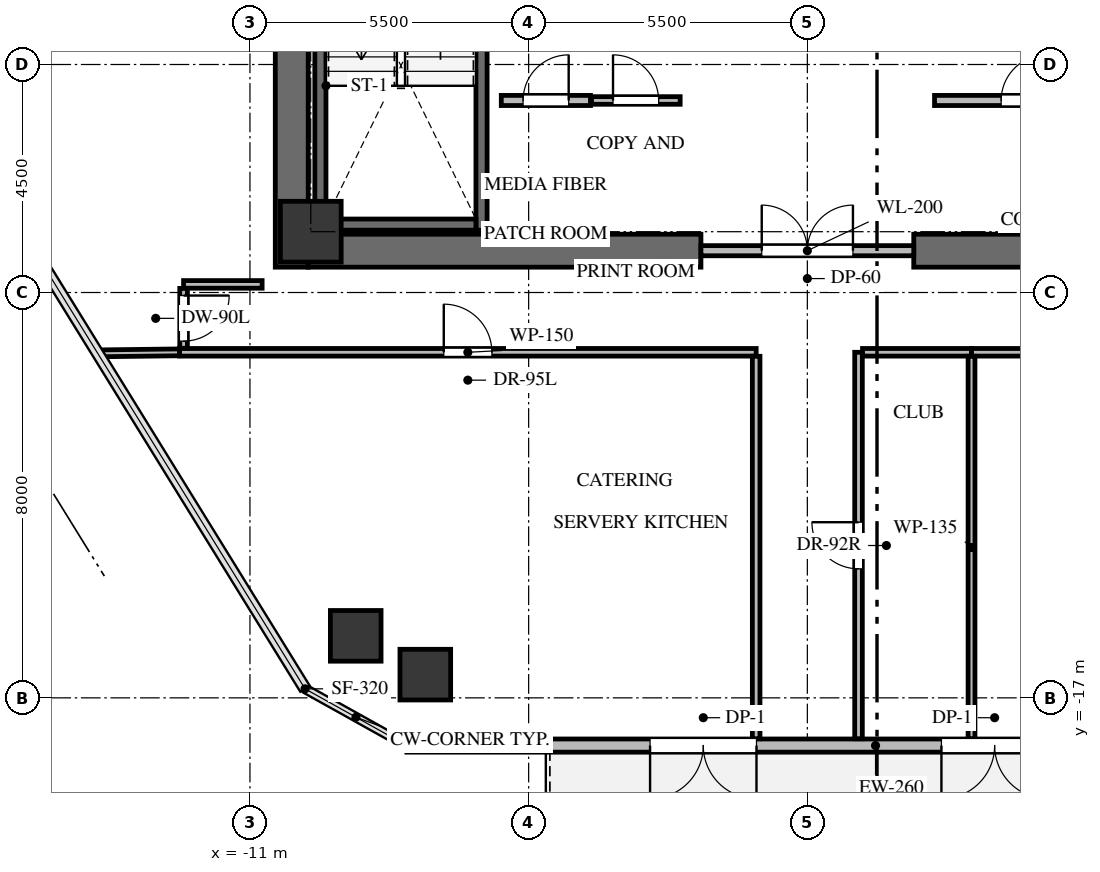
"""IFC4 building model, lengths in metres.
Left out: names, types, materials, properties, quantities, classifications, styles, units other than length and angle.
Written with IfcOpenShell. Run it as: python <this file> out.ifc"""

import sys

from ifc_helpers import new_model, si_unit, direction, frame, frame_2d, origin, origin_2d, place, context, subcontext, project, spatial, rectangle, extrude, source, transform, mapped, element, fill, save


model = new_model("IFC4")
c1 = context("Model", 3, precision=1e-05, world=origin(), true_north=direction((0.0, 1.0)))
c2 = subcontext(c1, "Body", "Model", "MODEL_VIEW")
j1 = project(units=[si_unit("LENGTHUNIT", "METRE"), si_unit("PLANEANGLEUNIT", "RADIAN")], contexts=[c1])
p1 = place(None, origin())
s1 = spatial("IfcSite", under=j1, at=p1, CompositionType="ELEMENT")
p2 = place(p1, origin())
s2 = spatial("IfcBuilding", under=s1, at=p2, CompositionType="ELEMENT")
p3 = place(p2, frame((0.0, 0.0, 162.6)))
s3 = spatial("IfcBuildingStorey", under=s2, at=p3, CompositionType="ELEMENT", Elevation=162.6)
p4 = place(p3, frame((-10.175, -8.5, 0.0), z_axis=(0.0, 0.0, 1.0), x_axis=(0.0, 1.0, 0.0)))
e1 = element("IfcWall", 1, at=p4, inside=s3, PredefinedType="SHEAR", context=c2, shape_type="SweptSolid", body=[
    extrude(rectangle(XDim=17.0, YDim=0.65, at=frame_2d((8.5, 0.0))), origin(), (0.0, 0.0, 1.0), 4.6),
])
for number, where, z_axis, x_axis in (
    (2, (-9.85, -8.175, 0.0), (0.0, 0.0, 1.0), (1.0, 0.0, 0.0)),
    (3, (2.1, -8.175, 0.0), (0.0, 0.0, 1.0), (1.0, 0.0, 0.0)),
):
    element("IfcWall", number, at=place(p3, frame(where, z_axis=z_axis, x_axis=x_axis)), inside=s3, PredefinedType="SHEAR", context=c2, shape_type="SweptSolid", body=[
        extrude(rectangle(XDim=7.75, YDim=0.65, at=frame_2d((3.875, 0.0))), origin(), (0.0, 0.0, 1.0), 4.6),
    ])
p5 = place(p3, frame((-6.43, -7.77, -0.32), z_axis=(0.0, 0.0, 1.0), x_axis=(0.0, 1.0, 0.0)))
e4 = element("IfcWall", 4, at=p5, inside=s3, PredefinedType="SHEAR", context=c2, shape_type="SweptSolid", body=[
    extrude(rectangle(XDim=7.89, YDim=0.22, at=frame_2d((3.945, 0.0))), origin(), (0.0, 0.0, 1.0), 4.68),
])
p6 = place(p5, frame((6.32, 0.0, 0.0)))
e5 = element("IfcOpeningElement", 5, at=p6, cuts=e4, PredefinedType="OPENING", context=c2, shape_type="SweptSolid", body=[
    extrude(rectangle(XDim=1.05, YDim=2.15, at=frame_2d((0.525, 1.075))), frame((0.0, 0.12, 0.0), z_axis=(0.0, -1.0, 0.0), x_axis=(1.0, 0.0, 0.0)), (0.0, 0.0, 1.0), 0.24),
])
p7 = place(p3, frame((-9.61, 0.12, -0.32), z_axis=(0.0, 0.0, 1.0), x_axis=(0.0, -1.0, 0.0)))
e6 = element("IfcWall", 6, at=p7, inside=s3, PredefinedType="SHEAR", context=c2, shape_type="SweptSolid", body=[
    extrude(rectangle(XDim=7.89, YDim=0.22, at=frame_2d((3.945, 0.0))), origin(), (0.0, 0.0, 1.0), 4.68),
])
p8 = place(p3, frame((-9.5, -7.66, -0.32), z_axis=(0.0, 0.0, 1.0), x_axis=(1.0, 0.0, 0.0)))
e7 = element("IfcWall", 7, at=p8, inside=s3, PredefinedType="SHEAR", context=c2, shape_type="SweptSolid", body=[
    extrude(rectangle(XDim=2.96, YDim=0.22, at=frame_2d((1.48, 0.0))), origin(), (0.0, 0.0, 1.0), 4.68),
])
m1 = source(origin(), c2, "Body", "SweptSolid", [
    extrude(rectangle(XDim=1.2, YDim=1.2, at=origin_2d()), origin(), (0.0, 0.0, 1.0), 4.68),
])
p9 = place(p3, frame((-9.8, -7.8, -0.32), z_axis=(0.0, 0.0, 1.0), x_axis=(1.0, 0.0, 0.0)))
e8 = element("IfcColumn", 8, at=p9, inside=s3, PredefinedType="COLUMN", context=c2, shape_type="MappedRepresentation", body=[
    mapped(m1, transform((0.0, 0.0, 0.0), x_axis=(1.0, 0.0, 0.0), y_axis=(0.0, 1.0, 0.0), z_axis=(0.0, 0.0, 1.0), scale=1.0)),
])
m2 = source(origin(), c2, "Body", "SweptSolid", [
    extrude(rectangle(XDim=1.0, YDim=1.0, at=origin_2d()), origin(), (0.0, 0.0, 1.0), 4.68),
])
for number, where, z_axis, x_axis in (
    (9, (-8.913, -15.776, -0.32), (0.0, 0.0, 1.0), (1.0, 0.0, 0.0)),
    (10, (-7.54, -16.542, -0.32), (0.0, 0.0, 1.0), (1.0, 0.0, 0.0)),
):
    element("IfcColumn", number, at=place(p3, frame(where, z_axis=z_axis, x_axis=x_axis)), inside=s3, PredefinedType="COLUMN", context=c2, shape_type="MappedRepresentation", body=[
        mapped(m2, transform((0.0, 0.0, 0.0), x_axis=(1.0, 0.0, 0.0), y_axis=(0.0, 1.0, 0.0), z_axis=(0.0, 0.0, 1.0), scale=1.0)),
    ])
p10 = place(p3, frame((10.595, -17.942, 0.0), z_axis=(0.0, 0.0, 1.0), x_axis=(-1.0, 0.0, 0.0)))
e11 = element("IfcWall", 11, at=p10, inside=s3, PredefinedType="SOLIDWALL", context=c2, shape_type="SweptSolid", body=[
    extrude(rectangle(XDim=18.499, YDim=0.26, at=frame_2d((9.249, 0.0))), origin(), (0.0, 0.0, 1.0), 4.36),
])
p11 = place(p10, frame((5.849, 0.0, 0.0)))
e12 = element("IfcOpeningElement", 12, at=p11, cuts=e11, PredefinedType="OPENING", context=c2, shape_type="SweptSolid", body=[
    extrude(rectangle(XDim=2.1, YDim=2.4, at=frame_2d((1.05, 1.2))), frame((0.0, 0.14, 0.0), z_axis=(0.0, -1.0, 0.0), x_axis=(1.0, 0.0, 0.0)), (0.0, 0.0, 1.0), 0.28),
])
p12 = place(p10, frame((11.599, 0.0, 0.0)))
e13 = element("IfcOpeningElement", 13, at=p12, cuts=e11, PredefinedType="OPENING", context=c2, shape_type="SweptSolid", body=[
    extrude(rectangle(XDim=2.1, YDim=2.4, at=frame_2d((1.05, 1.2))), frame((0.0, 0.14, 0.0), z_axis=(0.0, -1.0, 0.0), x_axis=(1.0, 0.0, 0.0)), (0.0, 0.0, 1.0), 0.28),
])
p13 = place(p3, frame((-2.1, -8.175, 0.0), z_axis=(0.0, 0.0, 1.0), x_axis=(1.0, 0.0, 0.0)))
e14 = element("IfcWall", 14, at=p13, inside=s3, PredefinedType="SOLIDWALL", context=c2, shape_type="SweptSolid", body=[
    extrude(rectangle(XDim=4.2, YDim=0.2, at=frame_2d((2.1, 0.0))), origin(), (0.0, 0.0, 1.0), 4.345),
])
p14 = place(p13, frame((1.2, 0.0, 0.0)))
e15 = element("IfcOpeningElement", 15, at=p14, cuts=e14, PredefinedType="OPENING", context=c2, shape_type="SweptSolid", body=[
    extrude(rectangle(XDim=1.8, YDim=2.15, at=frame_2d((0.9, 1.075))), frame((0.0, 0.11, 0.0), z_axis=(0.0, -1.0, 0.0), x_axis=(1.0, 0.0, 0.0)), (0.0, 0.0, 1.0), 0.22),
])
p15 = place(p3, frame((-6.04, -5.21, 0.0), z_axis=(0.0, 0.0, 1.0), x_axis=(1.0, 0.0, 0.0)))
e16 = element("IfcWall", 16, at=p15, inside=s3, PredefinedType="SOLIDWALL", context=c2, shape_type="SweptSolid", body=[
    extrude(rectangle(XDim=1.76, YDim=0.2, at=frame_2d((0.88, 0.0))), origin(), (0.0, 0.0, 1.0), 4.345),
])
p16 = place(p15, frame((0.43, 0.0, 0.0)))
e17 = element("IfcOpeningElement", 17, at=p16, cuts=e16, PredefinedType="OPENING", context=c2, shape_type="SweptSolid", body=[
    extrude(rectangle(XDim=0.9, YDim=2.05, at=frame_2d((0.45, 1.025))), frame((0.0, 0.11, 0.0), z_axis=(0.0, -1.0, 0.0), x_axis=(1.0, 0.0, 0.0)), (0.0, 0.0, 1.0), 0.22),
])
p17 = place(p3, frame((-4.26, -5.21, 0.0), z_axis=(0.0, 0.0, 1.0), x_axis=(1.0, 0.0, 0.0)))
e18 = element("IfcWall", 18, at=p17, inside=s3, PredefinedType="PARTITIONING", context=c2, shape_type="SweptSolid", body=[
    extrude(rectangle(XDim=1.75, YDim=0.15, at=frame_2d((0.875, 0.0))), origin(), (0.0, 0.0, 1.0), 4.345),
])
p18 = place(p17, frame((0.425, 0.0, 0.0)))
e19 = element("IfcOpeningElement", 19, at=p18, cuts=e18, PredefinedType="OPENING", context=c2, shape_type="SweptSolid", body=[
    extrude(rectangle(XDim=0.9, YDim=2.05, at=frame_2d((0.45, 1.025))), frame((0.0, 0.085, 0.0), z_axis=(0.0, -1.0, 0.0), x_axis=(1.0, 0.0, 0.0)), (0.0, 0.0, 1.0), 0.17),
])
p19 = place(p3, frame((2.51, -5.21, 0.0), z_axis=(0.0, 0.0, 1.0), x_axis=(1.0, 0.0, 0.0)))
e20 = element("IfcWall", 20, at=p19, inside=s3, PredefinedType="SOLIDWALL", context=c2, shape_type="SweptSolid", body=[
    extrude(rectangle(XDim=3.53, YDim=0.2, at=frame_2d((1.765, 0.0))), origin(), (0.0, 0.0, 1.0), 4.345),
])
p20 = place(p19, frame((1.315, 0.0, 0.0)))
e21 = element("IfcOpeningElement", 21, at=p20, cuts=e20, PredefinedType="OPENING", context=c2, shape_type="SweptSolid", body=[
    extrude(rectangle(XDim=0.9, YDim=2.05, at=frame_2d((0.45, 1.025))), frame((0.0, 0.11, 0.0), z_axis=(0.0, -1.0, 0.0), x_axis=(1.0, 0.0, 0.0)), (0.0, 0.0, 1.0), 0.22),
])
p21 = place(p3, frame((-12.39, -10.18, 0.0), z_axis=(0.0, 0.0, 1.0), x_axis=(1.0, 0.0, 0.0)))
e22 = element("IfcWall", 22, at=p21, inside=s3, PredefinedType="PARTITIONING", context=c2, shape_type="SweptSolid", body=[
    extrude(rectangle(XDim=11.38, YDim=0.15, at=frame_2d((5.69, 0.0))), origin(), (0.0, 0.0, 1.0), 3.542),
])
p22 = place(p21, frame((5.215, 0.0, 0.0)))
e23 = element("IfcOpeningElement", 23, at=p22, cuts=e22, PredefinedType="OPENING", context=c2, shape_type="SweptSolid", body=[
    extrude(rectangle(XDim=0.95, YDim=2.1, at=frame_2d((0.475, 1.05))), frame((0.0, 0.085, 0.0), z_axis=(0.0, -1.0, 0.0), x_axis=(1.0, 0.0, 0.0)), (0.0, 0.0, 1.0), 0.17),
])
p23 = place(p3, frame((-1.01, -10.259, 0.0), z_axis=(0.0, 0.0, 1.0), x_axis=(0.0, -1.0, 0.0)))
e24 = element("IfcWall", 24, at=p23, inside=s3, PredefinedType="PARTITIONING", context=c2, shape_type="SweptSolid", body=[
    extrude(rectangle(XDim=7.548, YDim=0.15, at=frame_2d((3.774, 0.0))), origin(), (0.0, 0.0, 1.0), 3.699),
])
p24 = place(p3, frame((1.01, -17.807, 0.0), z_axis=(0.0, 0.0, 1.0), x_axis=(0.0, 1.0, 0.0)))
e25 = element("IfcWall", 25, at=p24, inside=s3, PredefinedType="PARTITIONING", context=c2, shape_type="SweptSolid", body=[
    extrude(rectangle(XDim=7.627, YDim=0.15, at=frame_2d((3.813, 0.0))), origin(), (0.0, 0.0, 1.0), 3.699),
])
p25 = place(p24, frame((3.354, 0.0, 0.0)))
e26 = element("IfcOpeningElement", 26, at=p25, cuts=e25, PredefinedType="OPENING", context=c2, shape_type="SweptSolid", body=[
    extrude(rectangle(XDim=0.92, YDim=2.1, at=frame_2d((0.46, 1.05))), frame((0.0, 0.085, 0.0), z_axis=(0.0, -1.0, 0.0), x_axis=(1.0, 0.0, 0.0)), (0.0, 0.0, 1.0), 0.17),
])
p26 = place(p3, frame((1.089, -10.18, 0.0), z_axis=(0.0, 0.0, 1.0), x_axis=(1.0, 0.0, 0.0)))
e27 = element("IfcWall", 27, at=p26, inside=s3, PredefinedType="PARTITIONING", context=c2, shape_type="SweptSolid", body=[
    extrude(rectangle(XDim=2.151, YDim=0.15, at=frame_2d((1.075, 0.0))), origin(), (0.0, 0.0, 1.0), 3.908),
])
p27 = place(p3, frame((3.24, -10.18, 0.0), z_axis=(0.0, 0.0, 1.0), x_axis=(1.0, 0.0, 0.0)))
e28 = element("IfcWall", 28, at=p27, inside=s3, PredefinedType="PARTITIONING", context=c2, shape_type="SweptSolid", body=[
    extrude(rectangle(XDim=9.02, YDim=0.15, at=frame_2d((4.51, 0.0))), origin(), (0.0, 0.0, 1.0), 3.542),
])
p28 = place(p27, frame((4.035, 0.0, 0.0)))
e29 = element("IfcOpeningElement", 29, at=p28, cuts=e28, PredefinedType="OPENING", context=c2, shape_type="SweptSolid", body=[
    extrude(rectangle(XDim=0.95, YDim=2.1, at=frame_2d((0.475, 1.05))), frame((0.0, 0.085, 0.0), z_axis=(0.0, -1.0, 0.0), x_axis=(1.0, 0.0, 0.0)), (0.0, 0.0, 1.0), 0.17),
])
p29 = place(p3, frame((-10.76, -8.84, 0.0), z_axis=(0.0, 0.0, 1.0), x_axis=(-1.0, 0.0, 0.0)))
e30 = element("IfcWall", 30, at=p29, inside=s3, PredefinedType="PARTITIONING", context=c2, shape_type="SweptSolid", body=[
    extrude(rectangle(XDim=1.55, YDim=0.15, at=frame_2d((0.775, 0.0))), origin(), (0.0, 0.0, 1.0), 4.345),
])
p30 = place(p3, frame((-12.31, -8.919, 0.0), z_axis=(0.0, 0.0, 1.0), x_axis=(0.0, -1.0, 0.0)))
e31 = element("IfcWall", 31, at=p30, inside=s3, PredefinedType="PARTITIONING", context=c2, shape_type="SweptSolid", body=[
    extrude(rectangle(XDim=1.182, YDim=0.15, at=frame_2d((0.591, 0.0))), origin(), (0.0, 0.0, 1.0), 3.699),
])
p31 = place(p30, frame((0.141, 0.0, 0.0)))
e32 = element("IfcOpeningElement", 32, at=p31, cuts=e31, PredefinedType="OPENING", context=c2, shape_type="SweptSolid", body=[
    extrude(rectangle(XDim=0.9, YDim=2.05, at=frame_2d((0.45, 1.025))), frame((0.0, 0.085, 0.0), z_axis=(0.0, -1.0, 0.0), x_axis=(1.0, 0.0, 0.0)), (0.0, 0.0, 1.0), 0.17),
])
p32 = place(p3, frame((-14.004, -10.201, 0.0), z_axis=(0.0, 0.0, 1.0), x_axis=(0.999923084603, 0.012402615782, 0.0)))
e33 = element("IfcWall", 33, at=p32, inside=s3, PredefinedType="PARTITIONING", context=c2, shape_type="SweptSolid", body=[
    extrude(rectangle(XDim=1.614, YDim=0.135, at=frame_2d((0.807, 0.0))), origin(), (0.0, 0.0, 1.0), 3.699),
])
p33 = place(p3, frame((3.24, -10.259, 0.0), z_axis=(0.0, 0.0, 1.0), x_axis=(0.0, -1.0, 0.0)))
e34 = element("IfcWall", 34, at=p33, inside=s3, PredefinedType="PARTITIONING", context=c2, shape_type="SweptSolid", body=[
    extrude(rectangle(XDim=7.548, YDim=0.135, at=frame_2d((3.774, 0.0))), origin(), (0.0, 0.0, 1.0), 3.699),
])
m3 = source(origin(), c2, "Body", "SweptSolid", [
    extrude(rectangle(XDim=2.1, YDim=2.4, at=frame_2d((1.05, 1.2))), frame((0.0, 0.025, 0.0), z_axis=(0.0, -1.0, 0.0), x_axis=(1.0, 0.0, 0.0)), (0.0, 0.0, 1.0), 0.05),
])
p34 = place(p11, origin())
e35 = element("IfcDoor", 35, at=p34, inside=s3, OperationType="DOUBLE_DOOR_SINGLE_SWING", PredefinedType="DOOR", context=c2, shape_type="MappedRepresentation", body=[
    mapped(m3, transform((0.0, 0.0, 0.0), x_axis=(1.0, 0.0, 0.0), y_axis=(0.0, 1.0, 0.0), z_axis=(0.0, 0.0, 1.0), scale=1.0)),
])
fill(e12, e35)
p35 = place(p12, origin())
e36 = element("IfcDoor", 36, at=p35, inside=s3, OperationType="DOUBLE_DOOR_SINGLE_SWING", PredefinedType="DOOR", context=c2, shape_type="MappedRepresentation", body=[
    mapped(m3, transform((0.0, 0.0, 0.0), x_axis=(1.0, 0.0, 0.0), y_axis=(0.0, 1.0, 0.0), z_axis=(0.0, 0.0, 1.0), scale=1.0)),
])
fill(e13, e36)
m4 = source(origin(), c2, "Body", "SweptSolid", [
    extrude(rectangle(XDim=1.8, YDim=2.15, at=frame_2d((0.9, 1.075))), frame((0.0, 0.025, 0.0), z_axis=(0.0, -1.0, 0.0), x_axis=(1.0, 0.0, 0.0)), (0.0, 0.0, 1.0), 0.05),
])
p36 = place(p14, origin())
e37 = element("IfcDoor", 37, at=p36, inside=s3, OperationType="DOUBLE_DOOR_SINGLE_SWING", PredefinedType="DOOR", context=c2, shape_type="MappedRepresentation", body=[
    mapped(m4, transform((0.0, 0.0, 0.0), x_axis=(1.0, 0.0, 0.0), y_axis=(0.0, 1.0, 0.0), z_axis=(0.0, 0.0, 1.0), scale=1.0)),
])
fill(e15, e37)
m5 = source(origin(), c2, "Body", "SweptSolid", [
    extrude(rectangle(XDim=0.9, YDim=2.05, at=frame_2d((0.45, 1.025))), frame((0.0, 0.025, 0.0), z_axis=(0.0, -1.0, 0.0), x_axis=(1.0, 0.0, 0.0)), (0.0, 0.0, 1.0), 0.05),
])
p37 = place(p16, origin())
e38 = element("IfcDoor", 38, at=p37, inside=s3, OperationType="SINGLE_SWING_RIGHT", PredefinedType="DOOR", context=c2, shape_type="MappedRepresentation", body=[
    mapped(m5, transform((0.0, 0.0, 0.0), x_axis=(1.0, 0.0, 0.0), y_axis=(0.0, 1.0, 0.0), z_axis=(0.0, 0.0, 1.0), scale=1.0)),
])
fill(e17, e38)
m6 = source(origin(), c2, "Body", "SweptSolid", [
    extrude(rectangle(XDim=0.9, YDim=2.05, at=frame_2d((0.45, 1.025))), frame((0.0, 0.025, 0.0), z_axis=(0.0, -1.0, 0.0), x_axis=(1.0, 0.0, 0.0)), (0.0, 0.0, 1.0), 0.05),
])
p38 = place(p18, origin())
e39 = element("IfcDoor", 39, at=p38, inside=s3, OperationType="SINGLE_SWING_LEFT", PredefinedType="DOOR", context=c2, shape_type="MappedRepresentation", body=[
    mapped(m6, transform((0.0, 0.0, 0.0), x_axis=(1.0, 0.0, 0.0), y_axis=(0.0, 1.0, 0.0), z_axis=(0.0, 0.0, 1.0), scale=1.0)),
])
fill(e19, e39)
p39 = place(p20, origin())
e40 = element("IfcDoor", 40, at=p39, inside=s3, OperationType="SINGLE_SWING_RIGHT", PredefinedType="DOOR", context=c2, shape_type="MappedRepresentation", body=[
    mapped(m5, transform((0.0, 0.0, 0.0), x_axis=(1.0, 0.0, 0.0), y_axis=(0.0, 1.0, 0.0), z_axis=(0.0, 0.0, 1.0), scale=1.0)),
])
fill(e21, e40)
m7 = source(origin(), c2, "Body", "SweptSolid", [
    extrude(rectangle(XDim=0.95, YDim=2.1, at=frame_2d((0.475, 1.05))), frame((0.0, 0.025, 0.0), z_axis=(0.0, -1.0, 0.0), x_axis=(1.0, 0.0, 0.0)), (0.0, 0.0, 1.0), 0.05),
])
p40 = place(p22, origin())
e41 = element("IfcDoor", 41, at=p40, inside=s3, OperationType="SINGLE_SWING_LEFT", PredefinedType="DOOR", context=c2, shape_type="MappedRepresentation", body=[
    mapped(m7, transform((0.0, 0.0, 0.0), x_axis=(1.0, 0.0, 0.0), y_axis=(0.0, 1.0, 0.0), z_axis=(0.0, 0.0, 1.0), scale=1.0)),
])
fill(e23, e41)
m8 = source(origin(), c2, "Body", "SweptSolid", [
    extrude(rectangle(XDim=0.92, YDim=2.1, at=frame_2d((0.46, 1.05))), frame((0.0, 0.025, 0.0), z_axis=(0.0, -1.0, 0.0), x_axis=(1.0, 0.0, 0.0)), (0.0, 0.0, 1.0), 0.05),
])
p41 = place(p25, origin())
e42 = element("IfcDoor", 42, at=p41, inside=s3, OperationType="SINGLE_SWING_RIGHT", PredefinedType="DOOR", context=c2, shape_type="MappedRepresentation", body=[
    mapped(m8, transform((0.0, 0.0, 0.0), x_axis=(1.0, 0.0, 0.0), y_axis=(0.0, 1.0, 0.0), z_axis=(0.0, 0.0, 1.0), scale=1.0)),
])
fill(e26, e42)
m9 = source(origin(), c2, "Body", "SweptSolid", [
    extrude(rectangle(XDim=0.9, YDim=2.05, at=frame_2d((0.45, 1.025))), frame((0.0, 0.025, 0.0), z_axis=(0.0, -1.0, 0.0), x_axis=(1.0, 0.0, 0.0)), (0.0, 0.0, 1.0), 0.05),
])
p42 = place(p31, origin())
e43 = element("IfcDoor", 43, at=p42, inside=s3, OperationType="SINGLE_SWING_LEFT", PredefinedType="DOOR", context=c2, shape_type="MappedRepresentation", body=[
    mapped(m9, transform((0.0, 0.0, 0.0), x_axis=(1.0, 0.0, 0.0), y_axis=(0.0, 1.0, 0.0), z_axis=(0.0, 0.0, 1.0), scale=1.0)),
])
fill(e32, e43)
save(model, sys.argv[1])
